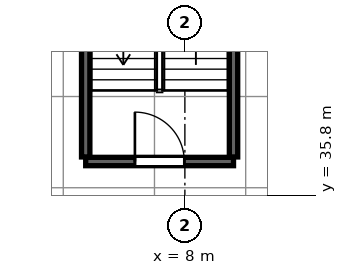
"""IFC4 building model, lengths in metres.
Left out: names, types, materials, properties, quantities, classifications, styles, units other than length and angle.
Written with IfcOpenShell. Run it as: python <this file> out.ifc"""

import sys

from ifc_helpers import new_model, si_unit, direction, frame, frame_2d, origin, place, context, subcontext, project, spatial, rectangle, extrude, source, transform, mapped, element, fill, save


model = new_model("IFC4")
c1 = context("Model", 3, precision=1e-05, world=origin(), true_north=direction((0.0, 1.0)))
c2 = subcontext(c1, "Body", "Model", "MODEL_VIEW")
j1 = project(units=[si_unit("LENGTHUNIT", "METRE"), si_unit("PLANEANGLEUNIT", "RADIAN")], contexts=[c1])
p1 = place(None, origin())
s1 = spatial("IfcSite", under=j1, at=p1, CompositionType="ELEMENT")
p2 = place(p1, origin())
s2 = spatial("IfcBuilding", under=s1, at=p2, CompositionType="ELEMENT")
p3 = place(p2, frame((0.0, 0.0, 18.0)))
s3 = spatial("IfcBuildingStorey", under=s2, at=p3, CompositionType="ELEMENT", Elevation=18.0)
m1 = source(origin(), c2, "Body", "SweptSolid", [
    extrude(rectangle(XDim=3.89, YDim=0.22, at=frame_2d((1.945, 0.0))), origin(), (0.0, 0.0, 1.0), 6.0),
])
p4 = place(p3, frame((5.39, 36.69, 0.0), z_axis=(0.0, 0.0, 1.0), x_axis=(1.0, 0.0, 0.0)))
e1 = element("IfcWall", 1, at=p4, inside=s3, PredefinedType="SOLIDWALL", context=c2, shape_type="MappedRepresentation", body=[
    mapped(m1, transform((0.0, 0.0, 0.0), scale=1.0)),
])
p5 = place(p4, frame((1.295, 0.0, 0.0)))
e2 = element("IfcOpeningElement", 2, at=p5, cuts=e1, PredefinedType="OPENING", context=c2, shape_type="SweptSolid", body=[
    extrude(rectangle(XDim=1.3, YDim=2.15, at=frame_2d((0.65, 1.075))), frame((0.0, 0.12, 0.0), z_axis=(0.0, -1.0, 0.0), x_axis=(1.0, 0.0, 0.0)), (0.0, 0.0, 1.0), 0.24),
])
m2 = source(origin(), c2, "Body", "SweptSolid", [
    extrude(rectangle(XDim=10.38, YDim=0.22, at=frame_2d((5.19, 0.0))), origin(), (0.0, 0.0, 1.0), 6.0),
])
for number, where, z_axis, x_axis in (
    (3, (5.39, 36.81, 0.0), (0.0, 0.0, 1.0), (0.0, 1.0, 0.0)),
    (4, (9.28, 36.81, 0.0), (0.0, 0.0, 1.0), (0.0, 1.0, 0.0)),
):
    element("IfcWall", number, at=place(p3, frame(where, z_axis=z_axis, x_axis=x_axis)), inside=s3, PredefinedType="SOLIDWALL", context=c2, shape_type="MappedRepresentation", body=[
        mapped(m2, transform((0.0, 0.0, 0.0), scale=1.0)),
    ])
m3 = source(origin(), c2, "Body", "SweptSolid", [
    extrude(rectangle(XDim=1.3, YDim=2.15, at=frame_2d((0.65, 1.075))), frame((0.0, 0.025, 0.0), z_axis=(0.0, -1.0, 0.0), x_axis=(1.0, 0.0, 0.0)), (0.0, 0.0, 1.0), 0.05),
])
p6 = place(p5, origin())
e5 = element("IfcDoor", 5, at=p6, inside=s3, OperationType="SINGLE_SWING_LEFT", PredefinedType="DOOR", context=c2, shape_type="MappedRepresentation", body=[
    mapped(m3, transform((0.0, 0.0, 0.0), scale=1.0)),
])
fill(e2, e5)
save(model, sys.argv[1])
